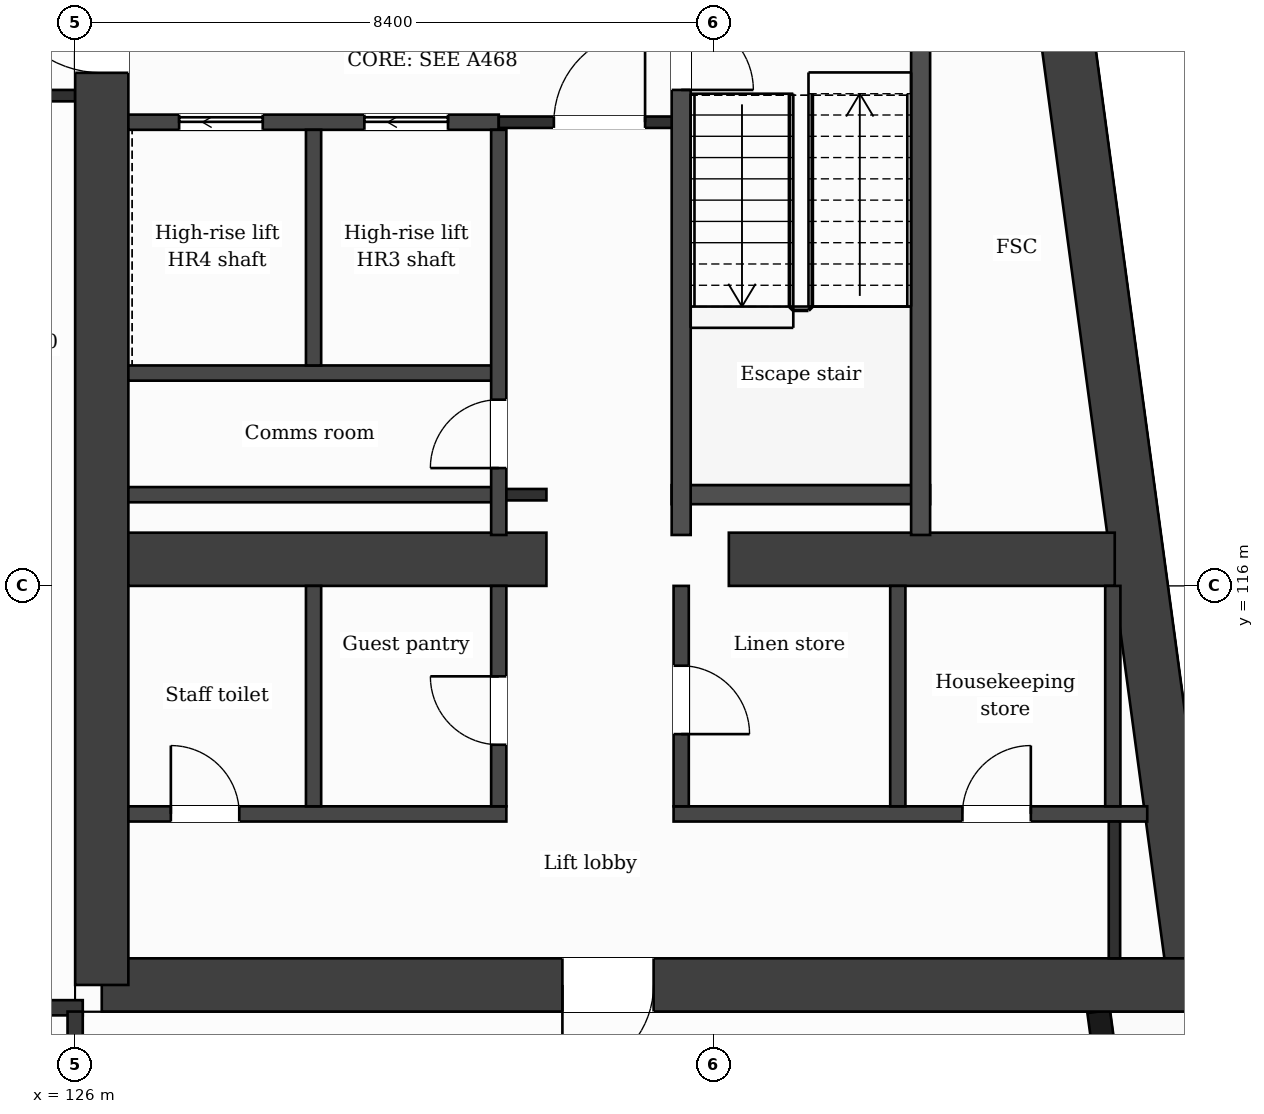
"""IFC4 building model, lengths in metres.
Left out: names, types, materials, properties, quantities, classifications, styles, units other than length and angle.
Written with IfcOpenShell. Run it as: python <this file> out.ifc"""

import sys

from ifc_helpers import new_model, si_unit, direction, frame, frame_2d, origin, place, context, subcontext, project, spatial, rectangle, extrude, element, fill, save


model = new_model("IFC4")
c1 = context("Model", 3, precision=1e-05, world=origin(), true_north=direction((0.0, 1.0)))
c2 = subcontext(c1, "Body", "Model", "MODEL_VIEW")
j1 = project(units=[si_unit("LENGTHUNIT", "METRE"), si_unit("PLANEANGLEUNIT", "RADIAN")], contexts=[c1])
p1 = place(None, origin())
s1 = spatial("IfcSite", under=j1, at=p1, CompositionType="ELEMENT")
p2 = place(p1, origin())
s2 = spatial("IfcBuilding", under=s1, at=p2, CompositionType="ELEMENT")
p3 = place(p2, frame((0.0, 0.0, 277.5)))
s3 = spatial("IfcBuildingStorey", under=s2, at=p3, CompositionType="ELEMENT", Elevation=277.5)
p4 = place(p3, frame((137.863, 132.05, 0.0), z_axis=(0.0, 0.0, 1.0), x_axis=(0.133406218907, -0.991061441464, 0.0)))
e1 = element("IfcWall", 1, at=p4, inside=s3, PredefinedType="SHEAR", context=c2, shape_type="SweptSolid", body=[
    extrude(rectangle(XDim=21.492, YDim=0.7, at=frame_2d((10.746, 0.0))), origin(), (0.0, 0.0, 1.0), 3.7),
])
p5 = place(p3, frame((140.73, 110.75, 0.0), z_axis=(0.0, 0.0, 1.0), x_axis=(-1.0, 0.0, 0.0)))
e2 = element("IfcWall", 2, at=p5, inside=s3, PredefinedType="SHEAR", context=c2, shape_type="SweptSolid", body=[
    extrude(rectangle(XDim=14.38, YDim=0.7, at=frame_2d((7.19, 0.0))), origin(), (0.0, 0.0, 1.0), 3.7),
])
p6 = place(p5, frame((7.12, 0.0, 0.0)))
e3 = element("IfcOpeningElement", 3, at=p6, cuts=e2, PredefinedType="OPENING", context=c2, shape_type="SweptSolid", body=[
    extrude(rectangle(XDim=1.2, YDim=2.1, at=frame_2d((0.6, 1.05))), frame((0.0, 0.36, 0.0), z_axis=(0.0, -1.0, 0.0), x_axis=(1.0, 0.0, 0.0)), (0.0, 0.0, 1.0), 0.72),
])
p7 = place(p3, frame((126.35, 110.75, 0.0), z_axis=(0.0, 0.0, 1.0), x_axis=(0.0, 1.0, 0.0)))
e4 = element("IfcWall", 4, at=p7, inside=s3, PredefinedType="SHEAR", context=c2, shape_type="SweptSolid", body=[
    extrude(rectangle(XDim=21.3, YDim=0.7, at=frame_2d((10.65, 0.0))), origin(), (0.0, 0.0, 1.0), 3.7),
])
p8 = place(p7, frame((12.0, 0.0, 0.0)))
e5 = element("IfcOpeningElement", 5, at=p8, cuts=e4, PredefinedType="OPENING", context=c2, shape_type="SweptSolid", body=[
    extrude(rectangle(XDim=1.4, YDim=2.1, at=frame_2d((0.7, 1.05))), frame((0.0, 0.36, 0.0), z_axis=(0.0, -1.0, 0.0), x_axis=(1.0, 0.0, 0.0)), (0.0, 0.0, 1.0), 0.72),
])
p9 = place(p3, frame((126.7, 116.35, 0.0), z_axis=(0.0, 0.0, 1.0), x_axis=(1.0, 0.0, 0.0)))
e6 = element("IfcWall", 6, at=p9, inside=s3, PredefinedType="SHEAR", context=c2, shape_type="SweptSolid", body=[
    extrude(rectangle(XDim=5.5, YDim=0.7, at=frame_2d((2.75, 0.0))), origin(), (0.0, 0.0, 1.0), 3.7),
])
p10 = place(p3, frame((134.6, 116.35, 0.0), z_axis=(0.0, 0.0, 1.0), x_axis=(1.0, 0.0, 0.0)))
e7 = element("IfcWall", 7, at=p10, inside=s3, PredefinedType="SHEAR", context=c2, shape_type="SweptSolid", body=[
    extrude(rectangle(XDim=5.077, YDim=0.7, at=frame_2d((2.539, 0.0))), origin(), (0.0, 0.0, 1.0), 3.7),
])
p11 = place(p3, frame((139.701, 108.65, 0.0), z_axis=(0.0, 0.0, 1.0), x_axis=(-0.133422458344, 0.991059255347, 0.0)))
e8 = element("IfcWall", 8, at=p11, inside=s3, PredefinedType="SOLIDWALL", context=c2, shape_type="SweptSolid", body=[
    extrude(rectangle(XDim=1.766, YDim=0.3, at=frame_2d((0.883, 0.0))), origin(), (0.0, 0.0, 1.0), 3.38),
])
p12 = place(p3, frame((100.7, 110.45, 0.0), z_axis=(0.0, 0.0, 1.0), x_axis=(1.0, 0.0, 0.0)))
e9 = element("IfcWall", 9, at=p12, inside=s3, PredefinedType="PARTITIONING", context=c2, shape_type="SweptSolid", body=[
    extrude(rectangle(XDim=25.4, YDim=0.2, at=frame_2d((12.7, 0.0))), origin(), (0.0, 0.0, 1.0), 3.38),
])
p13 = place(p3, frame((126.7, 113.0, 0.0), z_axis=(0.0, 0.0, 1.0), x_axis=(1.0, 0.0, 0.0)))
e10 = element("IfcWall", 10, at=p13, inside=s3, PredefinedType="PARTITIONING", context=c2, shape_type="SweptSolid", body=[
    extrude(rectangle(XDim=4.973, YDim=0.2, at=frame_2d((2.487, 0.0))), origin(), (0.0, 0.0, 1.0), 3.38),
])
p14 = place(p13, frame((0.559, 0.0, 0.0)))
e11 = element("IfcOpeningElement", 11, at=p14, cuts=e10, PredefinedType="OPENING", context=c2, shape_type="SweptSolid", body=[
    extrude(rectangle(XDim=0.9, YDim=2.1, at=frame_2d((0.45, 1.05))), frame((0.0, 0.11, 0.0), z_axis=(0.0, -1.0, 0.0), x_axis=(1.0, 0.0, 0.0)), (0.0, 0.0, 1.0), 0.22),
])
p15 = place(p3, frame((133.873, 113.0, 0.0), z_axis=(0.0, 0.0, 1.0), x_axis=(1.0, 0.0, 0.0)))
e12 = element("IfcWall", 12, at=p15, inside=s3, PredefinedType="PARTITIONING", context=c2, shape_type="SweptSolid", body=[
    extrude(rectangle(XDim=6.231, YDim=0.2, at=frame_2d((3.116, 0.0))), origin(), (0.0, 0.0, 1.0), 3.38),
])
p16 = place(p15, frame((3.8, 0.0, 0.0)))
e13 = element("IfcOpeningElement", 13, at=p16, cuts=e12, PredefinedType="OPENING", context=c2, shape_type="SweptSolid", body=[
    extrude(rectangle(XDim=0.9, YDim=2.1, at=frame_2d((0.45, 1.05))), frame((0.0, 0.11, 0.0), z_axis=(0.0, -1.0, 0.0), x_axis=(1.0, 0.0, 0.0)), (0.0, 0.0, 1.0), 0.22),
])
p17 = place(p3, frame((126.7, 117.2, 0.0), z_axis=(0.0, 0.0, 1.0), x_axis=(1.0, 0.0, 0.0)))
e14 = element("IfcWall", 14, at=p17, inside=s3, PredefinedType="PARTITIONING", context=c2, shape_type="SweptSolid", body=[
    extrude(rectangle(XDim=4.873, YDim=0.2, at=frame_2d((2.437, 0.0))), origin(), (0.0, 0.0, 1.0), 3.38),
])
p18 = place(p3, frame((131.573, 117.2, 0.0), z_axis=(0.0, 0.0, 1.0), x_axis=(1.0, 0.0, 0.0)))
e15 = element("IfcWall", 15, at=p18, inside=s3, PredefinedType="PARTITIONING", context=c2, shape_type="SweptSolid", body=[
    extrude(rectangle(XDim=0.627, YDim=0.15, at=frame_2d((0.313, 0.0))), origin(), (0.0, 0.0, 1.0), 3.38),
])
p19 = place(p3, frame((133.848, 117.2, 0.0), z_axis=(0.0, 0.0, 1.0), x_axis=(1.0, 0.0, 0.0)))
e16 = element("IfcWall", 16, at=p19, inside=s3, PredefinedType="PARTITIONING", context=c2, shape_type="SweptSolid", body=[
    extrude(rectangle(XDim=3.4, YDim=0.25, at=frame_2d((1.7, 0.0))), origin(), (0.0, 0.0, 1.0), 3.38),
])
p20 = place(p3, frame((126.7, 118.8, 0.0), z_axis=(0.0, 0.0, 1.0), x_axis=(1.0, 0.0, 0.0)))
e17 = element("IfcWall", 17, at=p20, inside=s3, PredefinedType="PARTITIONING", context=c2, shape_type="SweptSolid", body=[
    extrude(rectangle(XDim=4.873, YDim=0.2, at=frame_2d((2.437, 0.0))), origin(), (0.0, 0.0, 1.0), 3.38),
])
p21 = place(p3, frame((126.7, 122.1, 0.0), z_axis=(0.0, 0.0, 1.0), x_axis=(1.0, 0.0, 0.0)))
e18 = element("IfcWall", 18, at=p21, inside=s3, PredefinedType="PARTITIONING", context=c2, shape_type="SweptSolid", body=[
    extrude(rectangle(XDim=4.873, YDim=0.2, at=frame_2d((2.437, 0.0))), origin(), (0.0, 0.0, 1.0), 3.38),
])
p22 = place(p21, frame((3.105, 0.0, 0.0)))
e19 = element("IfcOpeningElement", 19, at=p22, cuts=e18, PredefinedType="OPENING", context=c2, shape_type="SweptSolid", body=[
    extrude(rectangle(XDim=1.1, YDim=2.1, at=frame_2d((0.55, 1.05))), frame((0.0, 0.11, 0.0), z_axis=(0.0, -1.0, 0.0), x_axis=(1.0, 0.0, 0.0)), (0.0, 0.0, 1.0), 0.22),
])
p23 = place(p21, frame((0.668, 0.0, 0.0)))
e20 = element("IfcOpeningElement", 20, at=p23, cuts=e18, PredefinedType="OPENING", context=c2, shape_type="SweptSolid", body=[
    extrude(rectangle(XDim=1.1, YDim=2.1, at=frame_2d((0.55, 1.05))), frame((0.0, 0.11, 0.0), z_axis=(0.0, -1.0, 0.0), x_axis=(1.0, 0.0, 0.0)), (0.0, 0.0, 1.0), 0.22),
])
p24 = place(p3, frame((131.573, 122.1, 0.0), z_axis=(0.0, 0.0, 1.0), x_axis=(1.0, 0.0, 0.0)))
e21 = element("IfcWall", 21, at=p24, inside=s3, PredefinedType="PARTITIONING", context=c2, shape_type="SweptSolid", body=[
    extrude(rectangle(XDim=2.4, YDim=0.15, at=frame_2d((1.2, 0.0))), origin(), (0.0, 0.0, 1.0), 3.38),
])
p25 = place(p24, frame((0.725, 0.0, 0.0)))
e22 = element("IfcOpeningElement", 22, at=p25, cuts=e21, PredefinedType="OPENING", context=c2, shape_type="SweptSolid", body=[
    extrude(rectangle(XDim=1.2, YDim=2.1, at=frame_2d((0.6, 1.05))), frame((0.0, 0.085, 0.0), z_axis=(0.0, -1.0, 0.0), x_axis=(1.0, 0.0, 0.0)), (0.0, 0.0, 1.0), 0.17),
])
p26 = place(p3, frame((100.8, 122.45, 0.0), z_axis=(0.0, 0.0, 1.0), x_axis=(1.0, 0.0, 0.0)))
e23 = element("IfcWall", 23, at=p26, inside=s3, PredefinedType="PARTITIONING", context=c2, shape_type="SweptSolid", body=[
    extrude(rectangle(XDim=25.2, YDim=0.15, at=frame_2d((12.6, 0.0))), origin(), (0.0, 0.0, 1.0), 3.38),
])
p27 = place(p26, frame((5.55, 0.0, 0.0)))
e24 = element("IfcOpeningElement", 24, at=p27, cuts=e23, PredefinedType="OPENING", context=c2, shape_type="SweptSolid", body=[
    extrude(rectangle(XDim=1.0, YDim=2.1, at=frame_2d((0.5, 1.05))), frame((0.0, 0.085, 0.0), z_axis=(0.0, -1.0, 0.0), x_axis=(1.0, 0.0, 0.0)), (0.0, 0.0, 1.0), 0.17),
])
p28 = place(p26, frame((8.862, 0.0, 0.0)))
e25 = element("IfcOpeningElement", 25, at=p28, cuts=e23, PredefinedType="OPENING", context=c2, shape_type="SweptSolid", body=[
    extrude(rectangle(XDim=0.95, YDim=2.1, at=frame_2d((0.475, 1.05))), frame((0.0, 0.085, 0.0), z_axis=(0.0, -1.0, 0.0), x_axis=(1.0, 0.0, 0.0)), (0.0, 0.0, 1.0), 0.17),
])
p29 = place(p26, frame((15.2, 0.0, 0.0)))
e26 = element("IfcOpeningElement", 26, at=p29, cuts=e23, PredefinedType="OPENING", context=c2, shape_type="SweptSolid", body=[
    extrude(rectangle(XDim=0.95, YDim=2.1, at=frame_2d((0.475, 1.05))), frame((0.0, 0.085, 0.0), z_axis=(0.0, -1.0, 0.0), x_axis=(1.0, 0.0, 0.0)), (0.0, 0.0, 1.0), 0.17),
])
p30 = place(p26, frame((17.325, 0.0, 0.0)))
e27 = element("IfcOpeningElement", 27, at=p30, cuts=e23, PredefinedType="OPENING", context=c2, shape_type="SweptSolid", body=[
    extrude(rectangle(XDim=1.0, YDim=2.1, at=frame_2d((0.5, 1.05))), frame((0.0, 0.085, 0.0), z_axis=(0.0, -1.0, 0.0), x_axis=(1.0, 0.0, 0.0)), (0.0, 0.0, 1.0), 0.17),
])
p31 = place(p26, frame((23.862, 0.0, 0.0)))
e28 = element("IfcOpeningElement", 28, at=p31, cuts=e23, PredefinedType="OPENING", context=c2, shape_type="SweptSolid", body=[
    extrude(rectangle(XDim=0.95, YDim=2.1, at=frame_2d((0.475, 1.05))), frame((0.0, 0.085, 0.0), z_axis=(0.0, -1.0, 0.0), x_axis=(1.0, 0.0, 0.0)), (0.0, 0.0, 1.0), 0.17),
])
p32 = place(p3, frame((126.0, 108.79, 0.0), z_axis=(0.0, 0.0, 1.0), x_axis=(0.0, 1.0, 0.0)))
e29 = element("IfcWall", 29, at=p32, inside=s3, PredefinedType="PARTITIONING", context=c2, shape_type="SweptSolid", body=[
    extrude(rectangle(XDim=1.61, YDim=0.2, at=frame_2d((0.805, 0.0))), origin(), (0.0, 0.0, 1.0), 3.38),
])
p33 = place(p3, frame((129.136, 113.1, 0.0), z_axis=(0.0, 0.0, 1.0), x_axis=(0.0, 1.0, 0.0)))
e30 = element("IfcWall", 30, at=p33, inside=s3, PredefinedType="PARTITIONING", context=c2, shape_type="SweptSolid", body=[
    extrude(rectangle(XDim=2.9, YDim=0.2, at=frame_2d((1.45, 0.0))), origin(), (0.0, 0.0, 1.0), 3.38),
])
p34 = place(p3, frame((129.136, 118.9, 0.0), z_axis=(0.0, 0.0, 1.0), x_axis=(0.0, 1.0, 0.0)))
e31 = element("IfcWall", 31, at=p34, inside=s3, PredefinedType="PARTITIONING", context=c2, shape_type="SweptSolid", body=[
    extrude(rectangle(XDim=3.1, YDim=0.2, at=frame_2d((1.55, 0.0))), origin(), (0.0, 0.0, 1.0), 3.38),
])
p35 = place(p3, frame((131.573, 113.1, 0.0), z_axis=(0.0, 0.0, 1.0), x_axis=(0.0, 1.0, 0.0)))
e32 = element("IfcWall", 32, at=p35, inside=s3, PredefinedType="PARTITIONING", context=c2, shape_type="SweptSolid", body=[
    extrude(rectangle(XDim=2.9, YDim=0.2, at=frame_2d((1.45, 0.0))), origin(), (0.0, 0.0, 1.0), 3.38),
])
p36 = place(p35, frame((0.81, 0.0, 0.0)))
e33 = element("IfcOpeningElement", 33, at=p36, cuts=e32, PredefinedType="OPENING", context=c2, shape_type="SweptSolid", body=[
    extrude(rectangle(XDim=0.9, YDim=2.1, at=frame_2d((0.45, 1.05))), frame((0.0, 0.11, 0.0), z_axis=(0.0, -1.0, 0.0), x_axis=(1.0, 0.0, 0.0)), (0.0, 0.0, 1.0), 0.22),
])
p37 = place(p3, frame((131.573, 116.67, 0.0), z_axis=(0.0, 0.0, 1.0), x_axis=(0.0, 1.0, 0.0)))
e34 = element("IfcWall", 34, at=p37, inside=s3, PredefinedType="PARTITIONING", context=c2, shape_type="SweptSolid", body=[
    extrude(rectangle(XDim=5.33, YDim=0.2, at=frame_2d((2.665, 0.0))), origin(), (0.0, 0.0, 1.0), 3.38),
])
p38 = place(p37, frame((0.88, 0.0, 0.0)))
e35 = element("IfcOpeningElement", 35, at=p38, cuts=e34, PredefinedType="OPENING", context=c2, shape_type="SweptSolid", body=[
    extrude(rectangle(XDim=0.9, YDim=2.1, at=frame_2d((0.45, 1.05))), frame((0.0, 0.11, 0.0), z_axis=(0.0, -1.0, 0.0), x_axis=(1.0, 0.0, 0.0)), (0.0, 0.0, 1.0), 0.22),
])
p39 = place(p3, frame((133.973, 113.1, 0.0), z_axis=(0.0, 0.0, 1.0), x_axis=(0.0, 1.0, 0.0)))
e36 = element("IfcWall", 36, at=p39, inside=s3, PredefinedType="PARTITIONING", context=c2, shape_type="SweptSolid", body=[
    extrude(rectangle(XDim=2.9, YDim=0.2, at=frame_2d((1.45, 0.0))), origin(), (0.0, 0.0, 1.0), 3.38),
])
p40 = place(p39, frame((0.95, 0.0, 0.0)))
e37 = element("IfcOpeningElement", 37, at=p40, cuts=e36, PredefinedType="OPENING", context=c2, shape_type="SweptSolid", body=[
    extrude(rectangle(XDim=0.9, YDim=2.1, at=frame_2d((0.45, 1.05))), frame((0.0, 0.11, 0.0), z_axis=(0.0, -1.0, 0.0), x_axis=(1.0, 0.0, 0.0)), (0.0, 0.0, 1.0), 0.22),
])
p41 = place(p3, frame((133.973, 116.67, 0.0), z_axis=(0.0, 0.0, 1.0), x_axis=(0.0, 1.0, 0.0)))
e38 = element("IfcWall", 38, at=p41, inside=s3, PredefinedType="PARTITIONING", context=c2, shape_type="SweptSolid", body=[
    extrude(rectangle(XDim=7.155, YDim=0.25, at=frame_2d((3.578, 0.0))), origin(), (0.0, 0.0, 1.0), 3.38),
])
p42 = place(p41, frame((5.855, 0.0, 0.0)))
e39 = element("IfcOpeningElement", 39, at=p42, cuts=e38, PredefinedType="OPENING", context=c2, shape_type="SweptSolid", body=[
    extrude(rectangle(XDim=0.95, YDim=2.1, at=frame_2d((0.475, 1.05))), frame((0.0, 0.135, 0.0), z_axis=(0.0, -1.0, 0.0), x_axis=(1.0, 0.0, 0.0)), (0.0, 0.0, 1.0), 0.27),
])
p43 = place(p3, frame((136.823, 113.1, 0.0), z_axis=(0.0, 0.0, 1.0), x_axis=(0.0, 1.0, 0.0)))
e40 = element("IfcWall", 40, at=p43, inside=s3, PredefinedType="PARTITIONING", context=c2, shape_type="SweptSolid", body=[
    extrude(rectangle(XDim=2.9, YDim=0.2, at=frame_2d((1.45, 0.0))), origin(), (0.0, 0.0, 1.0), 3.38),
])
p44 = place(p3, frame((137.123, 116.67, 0.0), z_axis=(0.0, 0.0, 1.0), x_axis=(0.0, 1.0, 0.0)))
e41 = element("IfcWall", 41, at=p44, inside=s3, PredefinedType="PARTITIONING", context=c2, shape_type="SweptSolid", body=[
    extrude(rectangle(XDim=7.155, YDim=0.25, at=frame_2d((3.578, 0.0))), origin(), (0.0, 0.0, 1.0), 3.38),
])
p45 = place(p3, frame((139.652, 113.1, 0.0), z_axis=(0.0, 0.0, 1.0), x_axis=(0.0, 1.0, 0.0)))
e42 = element("IfcWall", 42, at=p45, inside=s3, PredefinedType="PARTITIONING", context=c2, shape_type="SweptSolid", body=[
    extrude(rectangle(XDim=2.9, YDim=0.2, at=frame_2d((1.45, 0.0))), origin(), (0.0, 0.0, 1.0), 3.38),
])
p46 = place(p3, frame((139.673, 111.1, 0.0), z_axis=(0.0, 0.0, 1.0), x_axis=(0.0, 1.0, 0.0)))
e43 = element("IfcWall", 43, at=p46, inside=s3, PredefinedType="PARTITIONING", context=c2, shape_type="SweptSolid", body=[
    extrude(rectangle(XDim=1.8, YDim=0.15, at=frame_2d((0.9, 0.0))), origin(), (0.0, 0.0, 1.0), 3.38),
])
p47 = place(p25, origin())
e44 = element("IfcDoor", 44, at=p47, inside=s3, OperationType="SINGLE_SWING_RIGHT", PredefinedType="DOOR", context=c2, shape_type="SweptSolid", body=[
    extrude(rectangle(XDim=1.2, YDim=2.1, at=frame_2d((0.6, 1.05))), frame((0.0, 0.025, 0.0), z_axis=(0.0, -1.0, 0.0), x_axis=(1.0, 0.0, 0.0)), (0.0, 0.0, 1.0), 0.05),
])
fill(e22, e44)
p48 = place(p22, origin())
e45 = element("IfcDoor", 45, at=p48, inside=s3, OperationType="SLIDING_TO_LEFT", PredefinedType="DOOR", context=c2, shape_type="SweptSolid", body=[
    extrude(rectangle(XDim=1.1, YDim=2.1, at=frame_2d((0.55, 1.05))), frame((0.0, 0.025, 0.0), z_axis=(0.0, -1.0, 0.0), x_axis=(1.0, 0.0, 0.0)), (0.0, 0.0, 1.0), 0.05),
])
fill(e19, e45)
p49 = place(p23, origin())
e46 = element("IfcDoor", 46, at=p49, inside=s3, OperationType="SLIDING_TO_LEFT", PredefinedType="DOOR", context=c2, shape_type="SweptSolid", body=[
    extrude(rectangle(XDim=1.1, YDim=2.1, at=frame_2d((0.55, 1.05))), frame((0.0, 0.025, 0.0), z_axis=(0.0, -1.0, 0.0), x_axis=(1.0, 0.0, 0.0)), (0.0, 0.0, 1.0), 0.05),
])
fill(e20, e46)
p50 = place(p42, origin())
e47 = element("IfcDoor", 47, at=p50, inside=s3, OperationType="SINGLE_SWING_LEFT", PredefinedType="DOOR", context=c2, shape_type="SweptSolid", body=[
    extrude(rectangle(XDim=0.95, YDim=2.1, at=frame_2d((0.475, 1.05))), frame((0.0, 0.025, 0.0), z_axis=(0.0, -1.0, 0.0), x_axis=(1.0, 0.0, 0.0)), (0.0, 0.0, 1.0), 0.05),
])
fill(e39, e47)
p51 = place(p38, origin())
e48 = element("IfcDoor", 48, at=p51, inside=s3, OperationType="SINGLE_SWING_LEFT", PredefinedType="DOOR", context=c2, shape_type="SweptSolid", body=[
    extrude(rectangle(XDim=0.9, YDim=2.1, at=frame_2d((0.45, 1.05))), frame((0.0, 0.025, 0.0), z_axis=(0.0, -1.0, 0.0), x_axis=(1.0, 0.0, 0.0)), (0.0, 0.0, 1.0), 0.05),
])
fill(e35, e48)
p52 = place(p16, origin())
e49 = element("IfcDoor", 49, at=p52, inside=s3, OperationType="SINGLE_SWING_RIGHT", PredefinedType="DOOR", context=c2, shape_type="SweptSolid", body=[
    extrude(rectangle(XDim=0.9, YDim=2.1, at=frame_2d((0.45, 1.05))), frame((0.0, 0.025, 0.0), z_axis=(0.0, -1.0, 0.0), x_axis=(1.0, 0.0, 0.0)), (0.0, 0.0, 1.0), 0.05),
])
fill(e13, e49)
p53 = place(p40, origin())
e50 = element("IfcDoor", 50, at=p53, inside=s3, OperationType="SINGLE_SWING_LEFT", PredefinedType="DOOR", context=c2, shape_type="SweptSolid", body=[
    extrude(rectangle(XDim=0.9, YDim=2.1, at=frame_2d((0.45, 1.05))), frame((0.0, 0.025, 0.0), z_axis=(0.0, -1.0, 0.0), x_axis=(1.0, 0.0, 0.0)), (0.0, 0.0, 1.0), 0.05),
])
fill(e37, e50)
p54 = place(p36, origin())
e51 = element("IfcDoor", 51, at=p54, inside=s3, OperationType="SINGLE_SWING_RIGHT", PredefinedType="DOOR", context=c2, shape_type="SweptSolid", body=[
    extrude(rectangle(XDim=0.9, YDim=2.1, at=frame_2d((0.45, 1.05))), frame((0.0, 0.025, 0.0), z_axis=(0.0, -1.0, 0.0), x_axis=(1.0, 0.0, 0.0)), (0.0, 0.0, 1.0), 0.05),
])
fill(e33, e51)
p55 = place(p14, origin())
e52 = element("IfcDoor", 52, at=p55, inside=s3, OperationType="SINGLE_SWING_LEFT", PredefinedType="DOOR", context=c2, shape_type="SweptSolid", body=[
    extrude(rectangle(XDim=0.9, YDim=2.1, at=frame_2d((0.45, 1.05))), frame((0.0, 0.025, 0.0), z_axis=(0.0, -1.0, 0.0), x_axis=(1.0, 0.0, 0.0)), (0.0, 0.0, 1.0), 0.05),
])
fill(e11, e52)
p56 = place(p6, origin())
e53 = element("IfcDoor", 53, at=p56, inside=s3, OperationType="SINGLE_SWING_RIGHT", PredefinedType="DOOR", context=c2, shape_type="SweptSolid", body=[
    extrude(rectangle(XDim=1.2, YDim=2.1, at=frame_2d((0.6, 1.05))), frame((0.0, 0.025, 0.0), z_axis=(0.0, -1.0, 0.0), x_axis=(1.0, 0.0, 0.0)), (0.0, 0.0, 1.0), 0.05),
])
fill(e3, e53)
p57 = place(p8, origin())
e54 = element("IfcDoor", 54, at=p57, inside=s3, OperationType="SINGLE_SWING_RIGHT", PredefinedType="DOOR", context=c2, shape_type="SweptSolid", body=[
    extrude(rectangle(XDim=1.4, YDim=2.1, at=frame_2d((0.7, 1.05))), frame((0.0, 0.025, 0.0), z_axis=(0.0, -1.0, 0.0), x_axis=(1.0, 0.0, 0.0)), (0.0, 0.0, 1.0), 0.05),
])
fill(e5, e54)
save(model, sys.argv[1])
